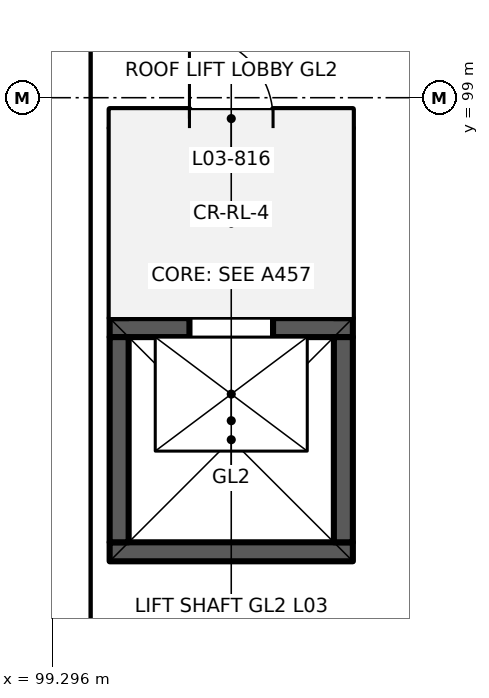
"""IFC4 building model, lengths in metres.
Left out: names, types, materials, properties, quantities, classifications, styles, units other than length and angle.
Written with IfcOpenShell. Run it as: python <this file> out.ifc"""

import sys

from ifc_helpers import new_model, si_unit, direction, frame, frame_2d, origin, place, context, subcontext, project, spatial, rectangle, extrude, element, fill, save


model = new_model("IFC4")
c1 = context("Model", 3, precision=1e-05, world=origin(), true_north=direction((0.0, 1.0)))
c2 = subcontext(c1, "Body", "Model", "MODEL_VIEW")
j1 = project(units=[si_unit("LENGTHUNIT", "METRE"), si_unit("PLANEANGLEUNIT", "RADIAN")], contexts=[c1])
p1 = place(None, origin())
s1 = spatial("IfcSite", under=j1, at=p1, CompositionType="ELEMENT")
p2 = place(p1, origin())
s2 = spatial("IfcBuilding", under=s1, at=p2, CompositionType="ELEMENT")
p3 = place(p2, frame((0.0, 0.0, 15.0)))
s3 = spatial("IfcBuildingStorey", under=s2, at=p3, CompositionType="ELEMENT", Elevation=15.0)
p4 = place(p3, frame((100.05, 95.975, 0.0), z_axis=(0.0, 0.0, 1.0), x_axis=(1.0, 0.0, 0.0)))
e1 = element("IfcWall", 1, at=p4, inside=s3, PredefinedType="SHEAR", context=c2, shape_type="SweptSolid", body=[
    extrude(rectangle(XDim=3.2, YDim=0.25, at=frame_2d((1.6, 0.0))), origin(), (0.0, 0.0, 1.0), 4.5),
])
p5 = place(p4, frame((1.05, 0.0, 0.0)))
e2 = element("IfcOpeningElement", 2, at=p5, cuts=e1, PredefinedType="OPENING", context=c2, shape_type="SweptSolid", body=[
    extrude(rectangle(XDim=1.1, YDim=2.1, at=frame_2d((0.55, 1.05))), frame((0.0, 0.135, 0.0), z_axis=(0.0, -1.0, 0.0), x_axis=(1.0, 0.0, 0.0)), (0.0, 0.0, 1.0), 0.27),
])
p6 = place(p3, frame((100.05, 93.025, 0.0), z_axis=(0.0, 0.0, 1.0), x_axis=(1.0, 0.0, 0.0)))
e3 = element("IfcWall", 3, at=p6, inside=s3, PredefinedType="SHEAR", context=c2, shape_type="SweptSolid", body=[
    extrude(rectangle(XDim=3.2, YDim=0.25, at=frame_2d((1.6, 0.0))), origin(), (0.0, 0.0, 1.0), 4.5),
])
for number, where, z_axis, x_axis in (
    (4, (100.175, 93.15, 0.0), (0.0, 0.0, 1.0), (0.0, 1.0, 0.0)),
    (5, (103.125, 93.15, 0.0), (0.0, 0.0, 1.0), (0.0, 1.0, 0.0)),
):
    element("IfcWall", number, at=place(p3, frame(where, z_axis=z_axis, x_axis=x_axis)), inside=s3, PredefinedType="SHEAR", context=c2, shape_type="SweptSolid", body=[
        extrude(rectangle(XDim=2.7, YDim=0.25, at=frame_2d((1.35, 0.0))), origin(), (0.0, 0.0, 1.0), 4.5),
    ])
p7 = place(p3, frame((100.05, 98.725, 0.0), z_axis=(0.0, 0.0, 1.0), x_axis=(1.0, 0.0, 0.0)))
e6 = element("IfcWall", 6, at=p7, inside=s3, PredefinedType="SHEAR", context=c2, shape_type="SweptSolid", body=[
    extrude(rectangle(XDim=3.2, YDim=0.25, at=frame_2d((1.6, 0.0))), origin(), (0.0, 0.0, 1.0), 3.0),
])
p8 = place(p7, frame((1.05, 0.0, 0.0)))
e7 = element("IfcOpeningElement", 7, at=p8, cuts=e6, PredefinedType="OPENING", context=c2, shape_type="SweptSolid", body=[
    extrude(rectangle(XDim=1.1, YDim=2.1, at=frame_2d((0.55, 1.05))), frame((0.0, 0.135, 0.0), z_axis=(0.0, -1.0, 0.0), x_axis=(1.0, 0.0, 0.0)), (0.0, 0.0, 1.0), 0.27),
])
for number, where, z_axis, x_axis in (
    (8, (100.175, 96.1, 0.0), (0.0, 0.0, 1.0), (0.0, 1.0, 0.0)),
    (9, (103.125, 96.1, 0.0), (0.0, 0.0, 1.0), (0.0, 1.0, 0.0)),
):
    element("IfcWall", number, at=place(p3, frame(where, z_axis=z_axis, x_axis=x_axis)), inside=s3, PredefinedType="SHEAR", context=c2, shape_type="SweptSolid", body=[
        extrude(rectangle(XDim=2.5, YDim=0.25, at=frame_2d((1.25, 0.0))), origin(), (0.0, 0.0, 1.0), 3.0),
    ])
p9 = place(p5, origin())
e10 = element("IfcDoor", 10, at=p9, inside=s3, OperationType="DOUBLE_DOOR_SLIDING", PredefinedType="DOOR", context=c2, shape_type="SweptSolid", body=[
    extrude(rectangle(XDim=1.1, YDim=2.1, at=frame_2d((0.55, 1.05))), frame((0.0, 0.025, 0.0), z_axis=(0.0, -1.0, 0.0), x_axis=(1.0, 0.0, 0.0)), (0.0, 0.0, 1.0), 0.05),
])
fill(e2, e10)
p10 = place(p8, origin())
e11 = element("IfcDoor", 11, at=p10, inside=s3, OperationType="SINGLE_SWING_LEFT", PredefinedType="DOOR", context=c2, shape_type="SweptSolid", body=[
    extrude(rectangle(XDim=1.1, YDim=2.1, at=frame_2d((0.55, 1.05))), frame((0.0, 0.025, 0.0), z_axis=(0.0, -1.0, 0.0), x_axis=(1.0, 0.0, 0.0)), (0.0, 0.0, 1.0), 0.05),
])
fill(e7, e11)
save(model, sys.argv[1])
